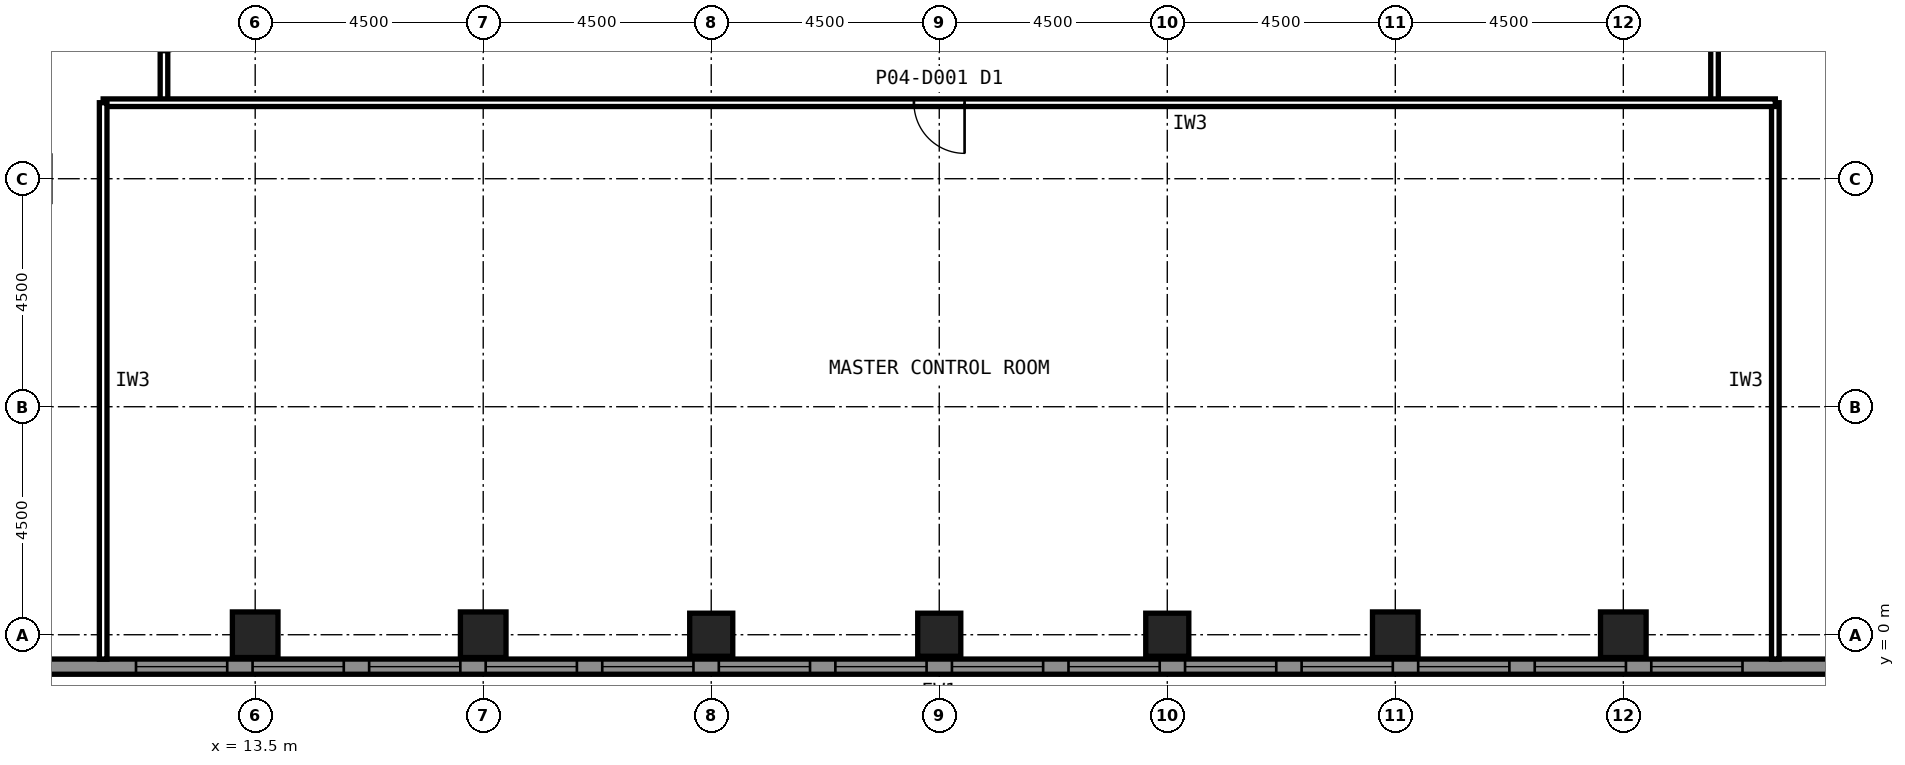
"""IFC4 building model, lengths in metres.
Left out: names, types, materials, properties, quantities, classifications, styles, units other than length and angle.
Written with IfcOpenShell. Run it as: python <this file> out.ifc"""

import sys

from ifc_helpers import new_model, si_unit, direction, frame, frame_2d, origin, origin_2d, place, context, subcontext, project, spatial, rectangle, hollow_rectangle, extrude, element, fill, save


model = new_model("IFC4")
c1 = context("Model", 3, precision=1e-05, world=origin(), true_north=direction((0.0, 1.0)))
c2 = subcontext(c1, "Body", "Model", "MODEL_VIEW")
j1 = project(units=[si_unit("LENGTHUNIT", "METRE"), si_unit("PLANEANGLEUNIT", "RADIAN")], contexts=[c1])
p1 = place(None, origin())
s1 = spatial("IfcSite", under=j1, at=p1, CompositionType="ELEMENT")
p2 = place(p1, origin())
s2 = spatial("IfcBuilding", under=s1, at=p2, CompositionType="ELEMENT")
p3 = place(p2, frame((0.0, 0.0, 18.0)))
s3 = spatial("IfcBuildingStorey", under=s2, at=p3, CompositionType="ELEMENT", Elevation=18.0)
for number, where, z_axis, x_axis in (
    (1, (13.5, 0.0, 0.0), (0.0, 0.0, 1.0), (1.0, 0.0, 0.0)),
    (2, (18.0, 0.0, 0.0), (0.0, 0.0, 1.0), (1.0, 0.0, 0.0)),
):
    element("IfcColumn", number, at=place(p3, frame(where, z_axis=z_axis, x_axis=x_axis)), inside=s3, PredefinedType="COLUMN", context=c2, shape_type="SweptSolid", body=[
        extrude(hollow_rectangle(XDim=0.9, YDim=0.9, WallThickness=0.063, at=origin_2d()), origin(), (0.0, 0.0, 1.0), 5.0),
    ])
for number, where, z_axis, x_axis in (
    (3, (22.5, 0.0, 0.0), (0.0, 0.0, 1.0), (1.0, 0.0, 0.0)),
    (4, (27.0, 0.0, 0.0), (0.0, 0.0, 1.0), (1.0, 0.0, 0.0)),
    (5, (31.5, 0.0, 0.0), (0.0, 0.0, 1.0), (1.0, 0.0, 0.0)),
):
    element("IfcColumn", number, at=place(p3, frame(where, z_axis=z_axis, x_axis=x_axis)), inside=s3, PredefinedType="COLUMN", context=c2, shape_type="SweptSolid", body=[
        extrude(hollow_rectangle(XDim=0.85, YDim=0.85, WallThickness=0.05, at=origin_2d()), origin(), (0.0, 0.0, 1.0), 5.0),
    ])
for number, where, z_axis, x_axis in (
    (6, (36.0, 0.0, 0.0), (0.0, 0.0, 1.0), (1.0, 0.0, 0.0)),
    (7, (40.5, 0.0, 0.0), (0.0, 0.0, 1.0), (1.0, 0.0, 0.0)),
):
    element("IfcColumn", number, at=place(p3, frame(where, z_axis=z_axis, x_axis=x_axis)), inside=s3, PredefinedType="COLUMN", context=c2, shape_type="SweptSolid", body=[
        extrude(hollow_rectangle(XDim=0.9, YDim=0.9, WallThickness=0.063, at=origin_2d()), origin(), (0.0, 0.0, 1.0), 5.0),
    ])
p4 = place(p3, frame((45.402, -0.63, 0.0), z_axis=(0.0, 0.0, 1.0), x_axis=(-1.0, 0.0, 0.0)))
e8 = element("IfcWall", 8, at=p4, inside=s3, PredefinedType="SOLIDWALL", context=c2, shape_type="SweptSolid", body=[
    extrude(rectangle(XDim=36.805, YDim=0.3, at=frame_2d((18.402, 0.0))), origin(), (0.0, 0.0, 1.0), 5.0),
])
p5 = place(p4, frame((2.551, 0.0, 1.1)))
e9 = element("IfcOpeningElement", 9, at=p5, cuts=e8, PredefinedType="OPENING", context=c2, shape_type="SweptSolid", body=[
    extrude(rectangle(XDim=1.8, YDim=1.2, at=frame_2d((0.9, 0.6))), frame((0.0, 0.16, 0.0), z_axis=(0.0, -1.0, 0.0), x_axis=(1.0, 0.0, 0.0)), (0.0, 0.0, 1.0), 0.32),
])
p6 = place(p4, frame((4.851, 0.0, 1.1)))
e10 = element("IfcOpeningElement", 10, at=p6, cuts=e8, PredefinedType="OPENING", context=c2, shape_type="SweptSolid", body=[
    extrude(rectangle(XDim=1.8, YDim=1.2, at=frame_2d((0.9, 0.6))), frame((0.0, 0.16, 0.0), z_axis=(0.0, -1.0, 0.0), x_axis=(1.0, 0.0, 0.0)), (0.0, 0.0, 1.0), 0.32),
])
p7 = place(p4, frame((7.151, 0.0, 1.1)))
e11 = element("IfcOpeningElement", 11, at=p7, cuts=e8, PredefinedType="OPENING", context=c2, shape_type="SweptSolid", body=[
    extrude(rectangle(XDim=1.8, YDim=1.2, at=frame_2d((0.9, 0.6))), frame((0.0, 0.16, 0.0), z_axis=(0.0, -1.0, 0.0), x_axis=(1.0, 0.0, 0.0)), (0.0, 0.0, 1.0), 0.32),
])
p8 = place(p4, frame((9.451, 0.0, 1.1)))
e12 = element("IfcOpeningElement", 12, at=p8, cuts=e8, PredefinedType="OPENING", context=c2, shape_type="SweptSolid", body=[
    extrude(rectangle(XDim=1.8, YDim=1.2, at=frame_2d((0.9, 0.6))), frame((0.0, 0.16, 0.0), z_axis=(0.0, -1.0, 0.0), x_axis=(1.0, 0.0, 0.0)), (0.0, 0.0, 1.0), 0.32),
])
p9 = place(p4, frame((11.752, 0.0, 1.1)))
e13 = element("IfcOpeningElement", 13, at=p9, cuts=e8, PredefinedType="OPENING", context=c2, shape_type="SweptSolid", body=[
    extrude(rectangle(XDim=1.8, YDim=1.2, at=frame_2d((0.9, 0.6))), frame((0.0, 0.16, 0.0), z_axis=(0.0, -1.0, 0.0), x_axis=(1.0, 0.0, 0.0)), (0.0, 0.0, 1.0), 0.32),
])
p10 = place(p4, frame((14.052, 0.0, 1.1)))
e14 = element("IfcOpeningElement", 14, at=p10, cuts=e8, PredefinedType="OPENING", context=c2, shape_type="SweptSolid", body=[
    extrude(rectangle(XDim=1.8, YDim=1.2, at=frame_2d((0.9, 0.6))), frame((0.0, 0.16, 0.0), z_axis=(0.0, -1.0, 0.0), x_axis=(1.0, 0.0, 0.0)), (0.0, 0.0, 1.0), 0.32),
])
p11 = place(p4, frame((16.352, 0.0, 1.1)))
e15 = element("IfcOpeningElement", 15, at=p11, cuts=e8, PredefinedType="OPENING", context=c2, shape_type="SweptSolid", body=[
    extrude(rectangle(XDim=1.8, YDim=1.2, at=frame_2d((0.9, 0.6))), frame((0.0, 0.16, 0.0), z_axis=(0.0, -1.0, 0.0), x_axis=(1.0, 0.0, 0.0)), (0.0, 0.0, 1.0), 0.32),
])
p12 = place(p4, frame((18.653, 0.0, 1.1)))
e16 = element("IfcOpeningElement", 16, at=p12, cuts=e8, PredefinedType="OPENING", context=c2, shape_type="SweptSolid", body=[
    extrude(rectangle(XDim=1.8, YDim=1.2, at=frame_2d((0.9, 0.6))), frame((0.0, 0.16, 0.0), z_axis=(0.0, -1.0, 0.0), x_axis=(1.0, 0.0, 0.0)), (0.0, 0.0, 1.0), 0.32),
])
p13 = place(p4, frame((20.953, 0.0, 1.1)))
e17 = element("IfcOpeningElement", 17, at=p13, cuts=e8, PredefinedType="OPENING", context=c2, shape_type="SweptSolid", body=[
    extrude(rectangle(XDim=1.8, YDim=1.2, at=frame_2d((0.9, 0.6))), frame((0.0, 0.16, 0.0), z_axis=(0.0, -1.0, 0.0), x_axis=(1.0, 0.0, 0.0)), (0.0, 0.0, 1.0), 0.32),
])
p14 = place(p4, frame((23.253, 0.0, 1.1)))
e18 = element("IfcOpeningElement", 18, at=p14, cuts=e8, PredefinedType="OPENING", context=c2, shape_type="SweptSolid", body=[
    extrude(rectangle(XDim=1.8, YDim=1.2, at=frame_2d((0.9, 0.6))), frame((0.0, 0.16, 0.0), z_axis=(0.0, -1.0, 0.0), x_axis=(1.0, 0.0, 0.0)), (0.0, 0.0, 1.0), 0.32),
])
p15 = place(p4, frame((25.553, 0.0, 1.1)))
e19 = element("IfcOpeningElement", 19, at=p15, cuts=e8, PredefinedType="OPENING", context=c2, shape_type="SweptSolid", body=[
    extrude(rectangle(XDim=1.8, YDim=1.2, at=frame_2d((0.9, 0.6))), frame((0.0, 0.16, 0.0), z_axis=(0.0, -1.0, 0.0), x_axis=(1.0, 0.0, 0.0)), (0.0, 0.0, 1.0), 0.32),
])
p16 = place(p4, frame((27.854, 0.0, 1.1)))
e20 = element("IfcOpeningElement", 20, at=p16, cuts=e8, PredefinedType="OPENING", context=c2, shape_type="SweptSolid", body=[
    extrude(rectangle(XDim=1.8, YDim=1.2, at=frame_2d((0.9, 0.6))), frame((0.0, 0.16, 0.0), z_axis=(0.0, -1.0, 0.0), x_axis=(1.0, 0.0, 0.0)), (0.0, 0.0, 1.0), 0.32),
])
p17 = place(p4, frame((30.154, 0.0, 1.1)))
e21 = element("IfcOpeningElement", 21, at=p17, cuts=e8, PredefinedType="OPENING", context=c2, shape_type="SweptSolid", body=[
    extrude(rectangle(XDim=1.8, YDim=1.2, at=frame_2d((0.9, 0.6))), frame((0.0, 0.16, 0.0), z_axis=(0.0, -1.0, 0.0), x_axis=(1.0, 0.0, 0.0)), (0.0, 0.0, 1.0), 0.32),
])
p18 = place(p4, frame((32.454, 0.0, 1.1)))
e22 = element("IfcOpeningElement", 22, at=p18, cuts=e8, PredefinedType="OPENING", context=c2, shape_type="SweptSolid", body=[
    extrude(rectangle(XDim=1.8, YDim=1.2, at=frame_2d((0.9, 0.6))), frame((0.0, 0.16, 0.0), z_axis=(0.0, -1.0, 0.0), x_axis=(1.0, 0.0, 0.0)), (0.0, 0.0, 1.0), 0.32),
])
p19 = place(p3, frame((42.3, 10.5, 0.0), z_axis=(0.0, 0.0, 1.0), x_axis=(0.0, 1.0, 0.0)))
e23 = element("IfcWall", 23, at=p19, inside=s3, PredefinedType="PARTITIONING", context=c2, shape_type="SweptSolid", body=[
    extrude(rectangle(XDim=7.5, YDim=0.15, at=frame_2d((3.75, 0.0))), origin(), (0.0, 0.0, 1.0), 4.8),
])
p20 = place(p19, frame((3.25, 0.0, 0.0)))
e24 = element("IfcOpeningElement", 24, at=p20, cuts=e23, PredefinedType="OPENING", context=c2, shape_type="SweptSolid", body=[
    extrude(rectangle(XDim=1.0, YDim=2.1, at=frame_2d((0.5, 1.05))), frame((0.0, 0.085, 0.0), z_axis=(0.0, -1.0, 0.0), x_axis=(1.0, 0.0, 0.0)), (0.0, 0.0, 1.0), 0.17),
])
p21 = place(p3, frame((11.7, 13.5, 0.0), z_axis=(0.0, 0.0, 1.0), x_axis=(0.0, -1.0, 0.0)))
e25 = element("IfcWall", 25, at=p21, inside=s3, PredefinedType="PARTITIONING", context=c2, shape_type="SweptSolid", body=[
    extrude(rectangle(XDim=3.0, YDim=0.15, at=frame_2d((1.5, 0.0))), origin(), (0.0, 0.0, 1.0), 4.8),
])
p22 = place(p21, frame((1.0, 0.0, 0.0)))
e26 = element("IfcOpeningElement", 26, at=p22, cuts=e25, PredefinedType="OPENING", context=c2, shape_type="SweptSolid", body=[
    extrude(rectangle(XDim=1.0, YDim=2.1, at=frame_2d((0.5, 1.05))), frame((0.0, 0.085, 0.0), z_axis=(0.0, -1.0, 0.0), x_axis=(1.0, 0.0, 0.0)), (0.0, 0.0, 1.0), 0.17),
])
p23 = place(p3, frame((43.5, -0.48, 0.0), z_axis=(0.0, 0.0, 1.0), x_axis=(0.0, 1.0, 0.0)))
e27 = element("IfcWall", 27, at=p23, inside=s3, PredefinedType="PARTITIONING", context=c2, shape_type="SweptSolid", body=[
    extrude(rectangle(XDim=10.98, YDim=0.15, at=frame_2d((5.49, 0.0))), origin(), (0.0, 0.0, 1.0), 4.8),
])
p24 = place(p3, frame((43.5, 10.5, 0.0), z_axis=(0.0, 0.0, 1.0), x_axis=(-1.0, 0.0, 0.0)))
e28 = element("IfcWall", 28, at=p24, inside=s3, PredefinedType="PARTITIONING", context=c2, shape_type="SweptSolid", body=[
    extrude(rectangle(XDim=33.0, YDim=0.15, at=frame_2d((16.5, 0.0))), origin(), (0.0, 0.0, 1.0), 4.8),
])
p25 = place(p24, frame((16.0, 0.0, 0.0)))
e29 = element("IfcOpeningElement", 29, at=p25, cuts=e28, PredefinedType="OPENING", context=c2, shape_type="SweptSolid", body=[
    extrude(rectangle(XDim=1.0, YDim=2.1, at=frame_2d((0.5, 1.05))), frame((0.0, 0.085, 0.0), z_axis=(0.0, -1.0, 0.0), x_axis=(1.0, 0.0, 0.0)), (0.0, 0.0, 1.0), 0.17),
])
p26 = place(p3, frame((10.5, 10.5, 0.0), z_axis=(0.0, 0.0, 1.0), x_axis=(0.0, -1.0, 0.0)))
e30 = element("IfcWall", 30, at=p26, inside=s3, PredefinedType="PARTITIONING", context=c2, shape_type="SweptSolid", body=[
    extrude(rectangle(XDim=10.98, YDim=0.15, at=frame_2d((5.49, 0.0))), origin(), (0.0, 0.0, 1.0), 4.8),
])
p27 = place(p5, origin())
e31 = element("IfcWindow", 31, at=p27, inside=s3, PartitioningType="SINGLE_PANEL", PredefinedType="WINDOW", context=c2, shape_type="SweptSolid", body=[
    extrude(rectangle(XDim=1.8, YDim=1.2, at=frame_2d((0.9, 0.6))), frame((0.0, 0.03, 0.0), z_axis=(0.0, -1.0, 0.0), x_axis=(1.0, 0.0, 0.0)), (0.0, 0.0, 1.0), 0.06),
])
fill(e9, e31)
p28 = place(p6, origin())
e32 = element("IfcWindow", 32, at=p28, inside=s3, PartitioningType="SINGLE_PANEL", PredefinedType="WINDOW", context=c2, shape_type="SweptSolid", body=[
    extrude(rectangle(XDim=1.8, YDim=1.2, at=frame_2d((0.9, 0.6))), frame((0.0, 0.03, 0.0), z_axis=(0.0, -1.0, 0.0), x_axis=(1.0, 0.0, 0.0)), (0.0, 0.0, 1.0), 0.06),
])
fill(e10, e32)
p29 = place(p7, origin())
e33 = element("IfcWindow", 33, at=p29, inside=s3, PartitioningType="SINGLE_PANEL", PredefinedType="WINDOW", context=c2, shape_type="SweptSolid", body=[
    extrude(rectangle(XDim=1.8, YDim=1.2, at=frame_2d((0.9, 0.6))), frame((0.0, 0.03, 0.0), z_axis=(0.0, -1.0, 0.0), x_axis=(1.0, 0.0, 0.0)), (0.0, 0.0, 1.0), 0.06),
])
fill(e11, e33)
p30 = place(p8, origin())
e34 = element("IfcWindow", 34, at=p30, inside=s3, PartitioningType="SINGLE_PANEL", PredefinedType="WINDOW", context=c2, shape_type="SweptSolid", body=[
    extrude(rectangle(XDim=1.8, YDim=1.2, at=frame_2d((0.9, 0.6))), frame((0.0, 0.03, 0.0), z_axis=(0.0, -1.0, 0.0), x_axis=(1.0, 0.0, 0.0)), (0.0, 0.0, 1.0), 0.06),
])
fill(e12, e34)
p31 = place(p9, origin())
e35 = element("IfcWindow", 35, at=p31, inside=s3, PartitioningType="SINGLE_PANEL", PredefinedType="WINDOW", context=c2, shape_type="SweptSolid", body=[
    extrude(rectangle(XDim=1.8, YDim=1.2, at=frame_2d((0.9, 0.6))), frame((0.0, 0.03, 0.0), z_axis=(0.0, -1.0, 0.0), x_axis=(1.0, 0.0, 0.0)), (0.0, 0.0, 1.0), 0.06),
])
fill(e13, e35)
p32 = place(p10, origin())
e36 = element("IfcWindow", 36, at=p32, inside=s3, PartitioningType="SINGLE_PANEL", PredefinedType="WINDOW", context=c2, shape_type="SweptSolid", body=[
    extrude(rectangle(XDim=1.8, YDim=1.2, at=frame_2d((0.9, 0.6))), frame((0.0, 0.03, 0.0), z_axis=(0.0, -1.0, 0.0), x_axis=(1.0, 0.0, 0.0)), (0.0, 0.0, 1.0), 0.06),
])
fill(e14, e36)
p33 = place(p11, origin())
e37 = element("IfcWindow", 37, at=p33, inside=s3, PartitioningType="SINGLE_PANEL", PredefinedType="WINDOW", context=c2, shape_type="SweptSolid", body=[
    extrude(rectangle(XDim=1.8, YDim=1.2, at=frame_2d((0.9, 0.6))), frame((0.0, 0.03, 0.0), z_axis=(0.0, -1.0, 0.0), x_axis=(1.0, 0.0, 0.0)), (0.0, 0.0, 1.0), 0.06),
])
fill(e15, e37)
p34 = place(p12, origin())
e38 = element("IfcWindow", 38, at=p34, inside=s3, PartitioningType="SINGLE_PANEL", PredefinedType="WINDOW", context=c2, shape_type="SweptSolid", body=[
    extrude(rectangle(XDim=1.8, YDim=1.2, at=frame_2d((0.9, 0.6))), frame((0.0, 0.03, 0.0), z_axis=(0.0, -1.0, 0.0), x_axis=(1.0, 0.0, 0.0)), (0.0, 0.0, 1.0), 0.06),
])
fill(e16, e38)
p35 = place(p13, origin())
e39 = element("IfcWindow", 39, at=p35, inside=s3, PartitioningType="SINGLE_PANEL", PredefinedType="WINDOW", context=c2, shape_type="SweptSolid", body=[
    extrude(rectangle(XDim=1.8, YDim=1.2, at=frame_2d((0.9, 0.6))), frame((0.0, 0.03, 0.0), z_axis=(0.0, -1.0, 0.0), x_axis=(1.0, 0.0, 0.0)), (0.0, 0.0, 1.0), 0.06),
])
fill(e17, e39)
p36 = place(p14, origin())
e40 = element("IfcWindow", 40, at=p36, inside=s3, PartitioningType="SINGLE_PANEL", PredefinedType="WINDOW", context=c2, shape_type="SweptSolid", body=[
    extrude(rectangle(XDim=1.8, YDim=1.2, at=frame_2d((0.9, 0.6))), frame((0.0, 0.03, 0.0), z_axis=(0.0, -1.0, 0.0), x_axis=(1.0, 0.0, 0.0)), (0.0, 0.0, 1.0), 0.06),
])
fill(e18, e40)
p37 = place(p15, origin())
e41 = element("IfcWindow", 41, at=p37, inside=s3, PartitioningType="SINGLE_PANEL", PredefinedType="WINDOW", context=c2, shape_type="SweptSolid", body=[
    extrude(rectangle(XDim=1.8, YDim=1.2, at=frame_2d((0.9, 0.6))), frame((0.0, 0.03, 0.0), z_axis=(0.0, -1.0, 0.0), x_axis=(1.0, 0.0, 0.0)), (0.0, 0.0, 1.0), 0.06),
])
fill(e19, e41)
p38 = place(p16, origin())
e42 = element("IfcWindow", 42, at=p38, inside=s3, PartitioningType="SINGLE_PANEL", PredefinedType="WINDOW", context=c2, shape_type="SweptSolid", body=[
    extrude(rectangle(XDim=1.8, YDim=1.2, at=frame_2d((0.9, 0.6))), frame((0.0, 0.03, 0.0), z_axis=(0.0, -1.0, 0.0), x_axis=(1.0, 0.0, 0.0)), (0.0, 0.0, 1.0), 0.06),
])
fill(e20, e42)
p39 = place(p17, origin())
e43 = element("IfcWindow", 43, at=p39, inside=s3, PartitioningType="SINGLE_PANEL", PredefinedType="WINDOW", context=c2, shape_type="SweptSolid", body=[
    extrude(rectangle(XDim=1.8, YDim=1.2, at=frame_2d((0.9, 0.6))), frame((0.0, 0.03, 0.0), z_axis=(0.0, -1.0, 0.0), x_axis=(1.0, 0.0, 0.0)), (0.0, 0.0, 1.0), 0.06),
])
fill(e21, e43)
p40 = place(p18, origin())
e44 = element("IfcWindow", 44, at=p40, inside=s3, PartitioningType="SINGLE_PANEL", PredefinedType="WINDOW", context=c2, shape_type="SweptSolid", body=[
    extrude(rectangle(XDim=1.8, YDim=1.2, at=frame_2d((0.9, 0.6))), frame((0.0, 0.03, 0.0), z_axis=(0.0, -1.0, 0.0), x_axis=(1.0, 0.0, 0.0)), (0.0, 0.0, 1.0), 0.06),
])
fill(e22, e44)
p41 = place(p25, origin())
e45 = element("IfcDoor", 45, at=p41, inside=s3, OperationType="SINGLE_SWING_LEFT", PredefinedType="DOOR", context=c2, shape_type="SweptSolid", body=[
    extrude(rectangle(XDim=1.0, YDim=2.1, at=frame_2d((0.5, 1.05))), frame((0.0, 0.025, 0.0), z_axis=(0.0, -1.0, 0.0), x_axis=(1.0, 0.0, 0.0)), (0.0, 0.0, 1.0), 0.05),
])
fill(e29, e45)
save(model, sys.argv[1])
